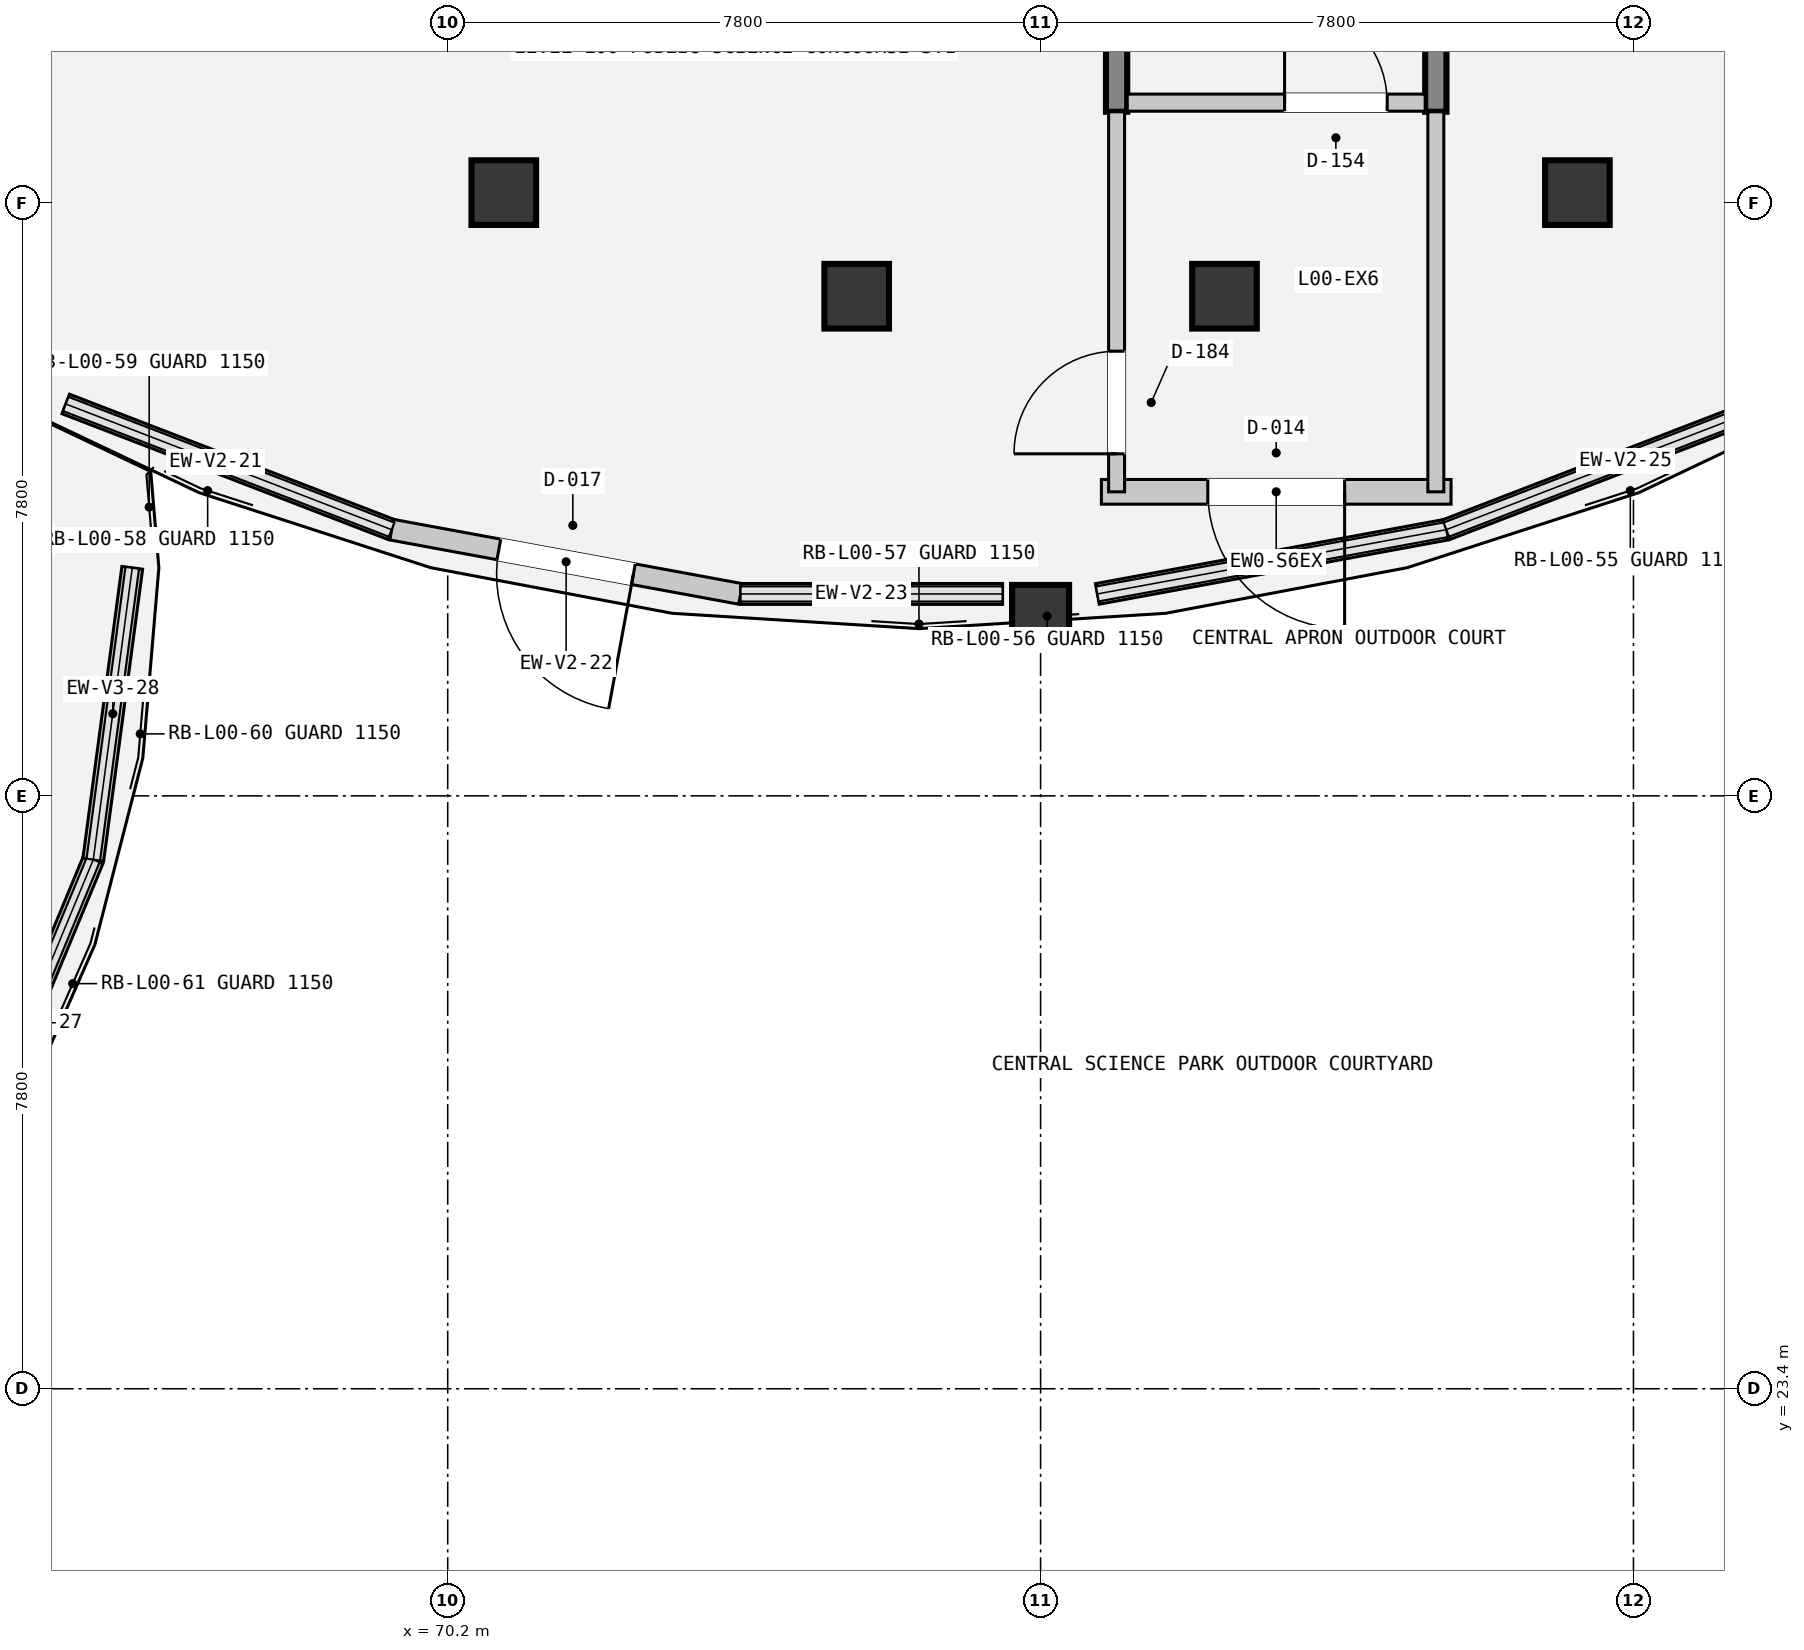
"""IFC4 building model, lengths in metres.
Left out: names, types, materials, properties, quantities, classifications, styles, units other than length and angle.
Written with IfcOpenShell. Run it as: python <this file> out.ifc"""

import sys

from ifc_helpers import new_model, si_unit, direction, frame, frame_2d, origin, origin_2d, place, context, subcontext, project, spatial, rectangle, circle, extrude, element, fill, save


model = new_model("IFC4")
c1 = context("Model", 3, precision=1e-05, world=origin(), true_north=direction((0.0, 1.0)))
c2 = subcontext(c1, "Body", "Model", "MODEL_VIEW")
j1 = project(units=[si_unit("LENGTHUNIT", "METRE"), si_unit("PLANEANGLEUNIT", "RADIAN")], contexts=[c1])
p1 = place(None, origin())
s1 = spatial("IfcSite", under=j1, at=p1, CompositionType="ELEMENT")
p2 = place(p1, origin())
s2 = spatial("IfcBuilding", under=s1, at=p2, CompositionType="ELEMENT")
p3 = place(p2, origin())
s3 = spatial("IfcBuildingStorey", under=s2, at=p3, CompositionType="ELEMENT", Elevation=0.0)
for number, where, z_axis, x_axis in (
    (1, (70.938, 39.136, 0.0), (0.0, 0.0, 1.0), (1.0, 0.0, 0.0)),
    (2, (75.581, 37.773, 0.0), (0.0, 0.0, 1.0), (1.0, 0.0, 0.0)),
    (3, (80.419, 37.773, 0.0), (0.0, 0.0, 1.0), (1.0, 0.0, 0.0)),
    (4, (85.062, 39.136, 0.0), (0.0, 0.0, 1.0), (1.0, 0.0, 0.0)),
):
    element("IfcColumn", number, at=place(p3, frame(where, z_axis=z_axis, x_axis=x_axis)), inside=s3, PredefinedType="COLUMN", context=c2, shape_type="SweptSolid", body=[
        extrude(circle(Radius=0.425, at=origin_2d()), origin(), (0.0, 0.0, 1.0), 5.4),
    ])
p4 = place(p3, frame((78.0, 33.6, 0.0), z_axis=(0.0, 0.0, 1.0), x_axis=(1.0, 0.0, 0.0)))
e5 = element("IfcColumn", 5, at=p4, inside=s3, PredefinedType="COLUMN", context=c2, shape_type="SweptSolid", body=[
    extrude(rectangle(XDim=0.75, YDim=0.75, at=origin_2d()), origin(), (0.0, 0.0, 1.0), 5.4),
])
for number, where, z_axis, x_axis in (
    (6, (79.0, 40.2, 0.0), (0.0, 0.0, 1.0), (0.0, 1.0, 0.0)),
    (7, (83.2, 40.2, 0.0), (0.0, 0.0, 1.0), (0.0, 1.0, 0.0)),
):
    element("IfcWall", number, at=place(p3, frame(where, z_axis=z_axis, x_axis=x_axis)), inside=s3, PredefinedType="SHEAR", context=c2, shape_type="SweptSolid", body=[
        extrude(rectangle(XDim=8.4, YDim=0.28, at=frame_2d((4.2, 0.0))), origin(), (0.0, 0.0, 1.0), 5.4),
    ])
p5 = place(p3, frame((64.025, 26.716, 0.0), z_axis=(0.0, 0.0, 1.0), x_axis=(0.383165625846, 0.923679653976, 0.0)))
e8 = element("IfcWall", 8, at=p5, inside=s3, PredefinedType="SOLIDWALL", context=c2, shape_type="SweptSolid", body=[
    extrude(rectangle(XDim=3.947, YDim=0.275, at=frame_2d((1.974, 0.0))), origin(), (0.0, 0.0, 1.0), 1.02),
])
p6 = place(p3, frame((65.537, 30.362, 0.0), z_axis=(0.0, 0.0, 1.0), x_axis=(0.132394974091, 0.99119703936, 0.0)))
e9 = element("IfcWall", 9, at=p6, inside=s3, PredefinedType="SOLIDWALL", context=c2, shape_type="SweptSolid", body=[
    extrude(rectangle(XDim=3.873, YDim=0.275, at=frame_2d((1.936, 0.0))), origin(), (0.0, 0.0, 1.0), 1.02),
])
p7 = place(p3, frame((65.175, 36.356, 0.0), z_axis=(0.0, 0.0, 1.0), x_axis=(0.933000129412, -0.359876032151, 0.0)))
e10 = element("IfcWall", 10, at=p7, inside=s3, PredefinedType="SOLIDWALL", context=c2, shape_type="SweptSolid", body=[
    extrude(rectangle(XDim=4.595, YDim=0.275, at=frame_2d((2.298, 0.0))), origin(), (0.0, 0.0, 1.0), 1.02),
])
p8 = place(p3, frame((74.053, 33.856, 0.0), z_axis=(0.0, 0.0, 1.0), x_axis=(-0.983459809052, 0.181126486132, 0.0)))
e11 = element("IfcWall", 11, at=p8, inside=s3, PredefinedType="SOLIDWALL", context=c2, shape_type="SweptSolid", body=[
    extrude(rectangle(XDim=4.668, YDim=0.275, at=frame_2d((2.334, 0.0))), origin(), (0.0, 0.0, 1.0), 4.46),
])
p9 = place(p8, frame((1.434, 0.0, 0.0)))
e12 = element("IfcOpeningElement", 12, at=p9, cuts=e11, PredefinedType="OPENING", context=c2, shape_type="SweptSolid", body=[
    extrude(rectangle(XDim=1.8, YDim=2.4, at=frame_2d((0.9, 1.2))), frame((0.0, 0.147, 0.0), z_axis=(0.0, -1.0, 0.0), x_axis=(1.0, 0.0, 0.0)), (0.0, 0.0, 1.0), 0.295),
])
p10 = place(p3, frame((74.053, 33.856, 0.0), z_axis=(0.0, 0.0, 1.0), x_axis=(1.0, 0.0, 0.0)))
e13 = element("IfcWall", 13, at=p10, inside=s3, PredefinedType="SOLIDWALL", context=c2, shape_type="SweptSolid", body=[
    extrude(rectangle(XDim=3.447, YDim=0.275, at=frame_2d((1.723, 0.0))), origin(), (0.0, 0.0, 1.0), 1.02),
])
p11 = place(p3, frame((78.747, 33.856, 0.0), z_axis=(0.0, 0.0, 1.0), x_axis=(0.983461524826, 0.181117169776, 0.0)))
e14 = element("IfcWall", 14, at=p11, inside=s3, PredefinedType="SOLIDWALL", context=c2, shape_type="SweptSolid", body=[
    extrude(rectangle(XDim=4.668, YDim=0.275, at=frame_2d((2.334, 0.0))), origin(), (0.0, 0.0, 1.0), 1.02),
])
p12 = place(p3, frame((83.337, 34.702, 0.0), z_axis=(0.0, 0.0, 1.0), x_axis=(0.933000129412, 0.359876032151, 0.0)))
e15 = element("IfcWall", 15, at=p12, inside=s3, PredefinedType="SOLIDWALL", context=c2, shape_type="SweptSolid", body=[
    extrude(rectangle(XDim=4.595, YDim=0.275, at=frame_2d((2.298, 0.0))), origin(), (0.0, 0.0, 1.0), 1.02),
])
p13 = place(p3, frame((83.4, 35.2, 0.0), z_axis=(0.0, 0.0, 1.0), x_axis=(-1.0, 0.0, 0.0)))
e16 = element("IfcWall", 16, at=p13, inside=s3, PredefinedType="SOLIDWALL", context=c2, shape_type="SweptSolid", body=[
    extrude(rectangle(XDim=4.6, YDim=0.325, at=frame_2d((2.3, 0.0))), origin(), (0.0, 0.0, 1.0), 4.46),
])
p14 = place(p13, frame((1.4, 0.0, 0.0)))
e17 = element("IfcOpeningElement", 17, at=p14, cuts=e16, PredefinedType="OPENING", context=c2, shape_type="SweptSolid", body=[
    extrude(rectangle(XDim=1.8, YDim=2.4, at=frame_2d((0.9, 1.2))), frame((0.0, 0.172, 0.0), z_axis=(0.0, -1.0, 0.0), x_axis=(1.0, 0.0, 0.0)), (0.0, 0.0, 1.0), 0.345),
])
p15 = place(p3, frame((79.14, 40.32, 0.0), z_axis=(0.0, 0.0, 1.0), x_axis=(1.0, 0.0, 0.0)))
e18 = element("IfcWall", 18, at=p15, inside=s3, PredefinedType="PARTITIONING", context=c2, shape_type="SweptSolid", body=[
    extrude(rectangle(XDim=3.92, YDim=0.225, at=frame_2d((1.96, 0.0))), origin(), (0.0, 0.0, 1.0), 4.11),
])
p16 = place(p15, frame((2.07, 0.0, 0.0)))
e19 = element("IfcOpeningElement", 19, at=p16, cuts=e18, PredefinedType="OPENING", context=c2, shape_type="SweptSolid", body=[
    extrude(rectangle(XDim=1.35, YDim=2.2, at=frame_2d((0.675, 1.1))), frame((0.0, 0.123, 0.0), z_axis=(0.0, -1.0, 0.0), x_axis=(1.0, 0.0, 0.0)), (0.0, 0.0, 1.0), 0.245),
])
p17 = place(p3, frame((83.2, 35.2, 0.0), z_axis=(0.0, 0.0, 1.0), x_axis=(0.0, 1.0, 0.0)))
e20 = element("IfcWall", 20, at=p17, inside=s3, PredefinedType="PARTITIONING", context=c2, shape_type="SweptSolid", body=[
    extrude(rectangle(XDim=5.0, YDim=0.21, at=frame_2d((2.5, 0.0))), origin(), (0.0, 0.0, 1.0), 3.45),
])
p18 = place(p3, frame((79.0, 35.2, 0.0), z_axis=(0.0, 0.0, 1.0), x_axis=(0.0, 1.0, 0.0)))
e21 = element("IfcWall", 21, at=p18, inside=s3, PredefinedType="PARTITIONING", context=c2, shape_type="SweptSolid", body=[
    extrude(rectangle(XDim=5.0, YDim=0.21, at=frame_2d((2.5, 0.0))), origin(), (0.0, 0.0, 1.0), 3.45),
])
p19 = place(p18, frame((0.5, 0.0, 0.0)))
e22 = element("IfcOpeningElement", 22, at=p19, cuts=e21, PredefinedType="OPENING", context=c2, shape_type="SweptSolid", body=[
    extrude(rectangle(XDim=1.35, YDim=2.2, at=frame_2d((0.675, 1.1))), frame((0.0, 0.115, 0.0), z_axis=(0.0, -1.0, 0.0), x_axis=(1.0, 0.0, 0.0)), (0.0, 0.0, 1.0), 0.23),
])
p20 = place(p9, origin())
e23 = element("IfcDoor", 23, at=p20, inside=s3, OperationType="DOUBLE_DOOR_SINGLE_SWING", PredefinedType="DOOR", context=c2, shape_type="SweptSolid", body=[
    extrude(rectangle(XDim=1.8, YDim=2.4, at=frame_2d((0.9, 1.2))), frame((0.0, 0.025, 0.0), z_axis=(0.0, -1.0, 0.0), x_axis=(1.0, 0.0, 0.0)), (0.0, 0.0, 1.0), 0.05),
])
fill(e12, e23)
p21 = place(p14, origin())
e24 = element("IfcDoor", 24, at=p21, inside=s3, OperationType="DOUBLE_DOOR_SINGLE_SWING", PredefinedType="DOOR", context=c2, shape_type="SweptSolid", body=[
    extrude(rectangle(XDim=1.8, YDim=2.4, at=frame_2d((0.9, 1.2))), frame((0.0, 0.025, 0.0), z_axis=(0.0, -1.0, 0.0), x_axis=(1.0, 0.0, 0.0)), (0.0, 0.0, 1.0), 0.05),
])
fill(e17, e24)
p22 = place(p16, origin())
e25 = element("IfcDoor", 25, at=p22, inside=s3, OperationType="SINGLE_SWING_LEFT", PredefinedType="DOOR", context=c2, shape_type="SweptSolid", body=[
    extrude(rectangle(XDim=1.35, YDim=2.2, at=frame_2d((0.675, 1.1))), frame((0.0, 0.025, 0.0), z_axis=(0.0, -1.0, 0.0), x_axis=(1.0, 0.0, 0.0)), (0.0, 0.0, 1.0), 0.05),
])
fill(e19, e25)
p23 = place(p19, origin())
e26 = element("IfcDoor", 26, at=p23, inside=s3, OperationType="SINGLE_SWING_LEFT", PredefinedType="DOOR", context=c2, shape_type="SweptSolid", body=[
    extrude(rectangle(XDim=1.35, YDim=2.2, at=frame_2d((0.675, 1.1))), frame((0.0, 0.025, 0.0), z_axis=(0.0, -1.0, 0.0), x_axis=(1.0, 0.0, 0.0)), (0.0, 0.0, 1.0), 0.05),
])
fill(e22, e26)
save(model, sys.argv[1])
